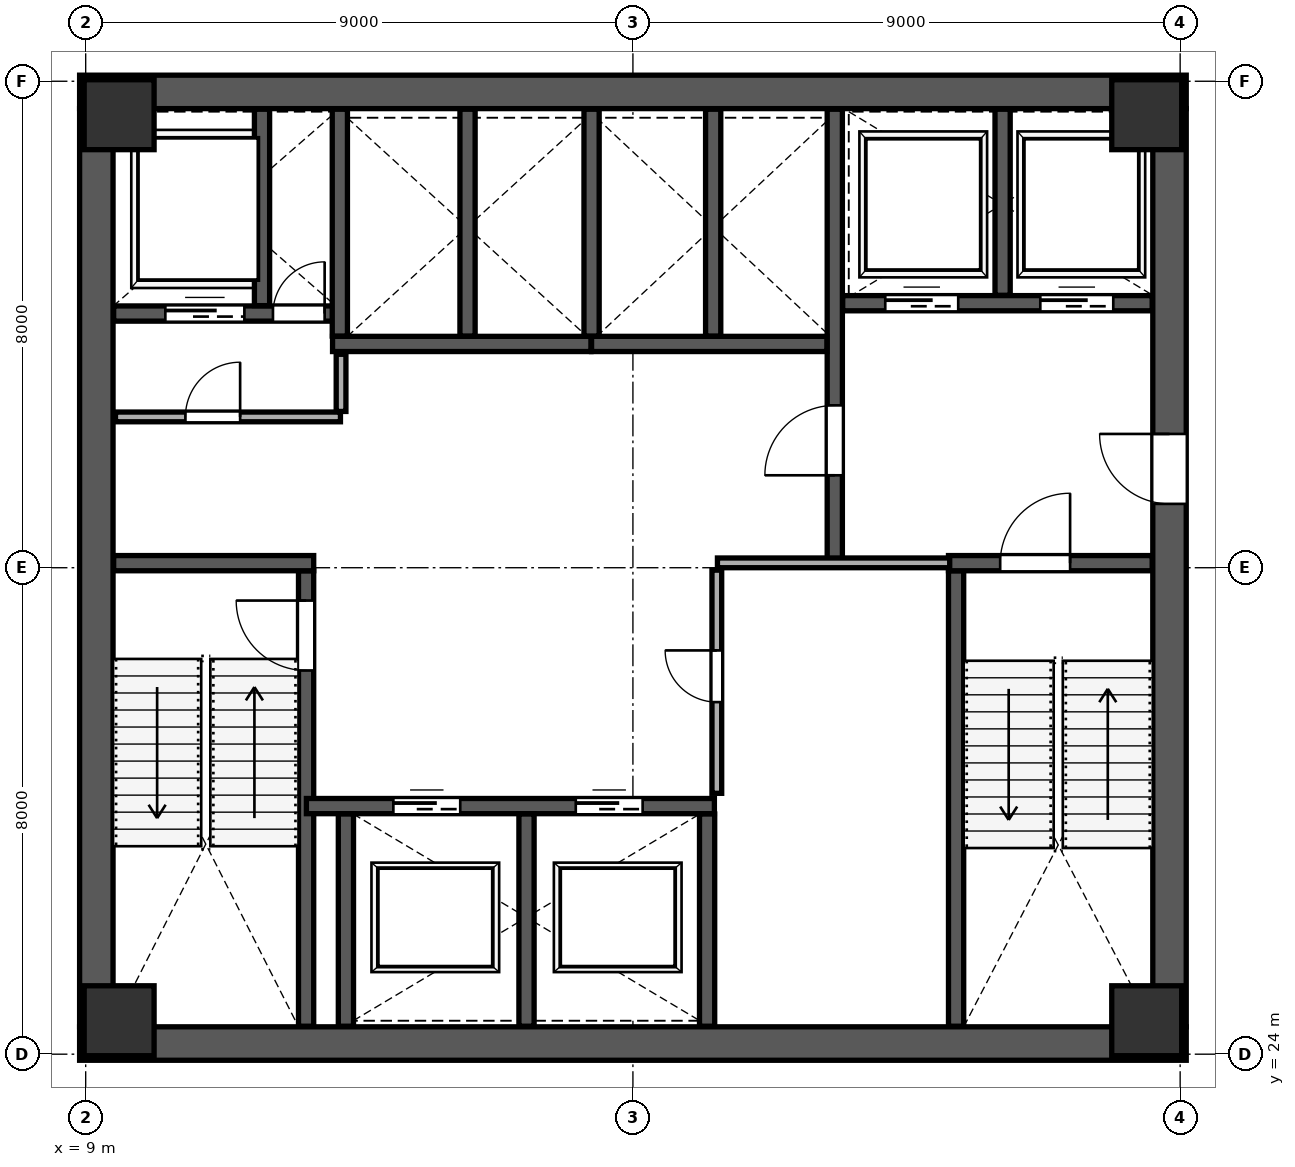
"""IFC4 building model, lengths in metres.
Left out: names, types, materials, properties, quantities, classifications, styles, units other than length and angle.
Written with IfcOpenShell. Run it as: python <this file> out.ifc"""

import sys

from ifc_helpers import new_model, si_unit, direction, frame, frame_2d, origin, origin_2d, place, context, subcontext, project, spatial, rectangle, extrude, source, transform, mapped, element, fill, save


model = new_model("IFC4")
c1 = context("Model", 3, precision=1e-05, world=origin(), true_north=direction((0.0, 1.0)))
c2 = subcontext(c1, "Body", "Model", "MODEL_VIEW")
j1 = project(units=[si_unit("LENGTHUNIT", "METRE"), si_unit("PLANEANGLEUNIT", "RADIAN")], contexts=[c1])
p1 = place(None, origin())
s1 = spatial("IfcSite", under=j1, at=p1, CompositionType="ELEMENT")
p2 = place(p1, origin())
s2 = spatial("IfcBuilding", under=s1, at=p2, CompositionType="ELEMENT")
p3 = place(p2, frame((0.0, 0.0, 66.4)))
s3 = spatial("IfcBuildingStorey", under=s2, at=p3, CompositionType="ELEMENT", Elevation=66.4)
m1 = source(origin(), c2, "Body", "SweptSolid", [
    extrude(rectangle(XDim=1.15, YDim=1.15, at=origin_2d()), origin(), (0.0, 0.0, 1.0), 4.199),
])
for number, where, z_axis, x_axis in (
    (1, (9.55, 24.55, 0.001), (0.0, 0.0, 1.0), (1.0, 0.0, 0.0)),
    (2, (26.45, 24.55, 0.001), (0.0, 0.0, 1.0), (1.0, 0.0, 0.0)),
    (3, (9.55, 39.45, 0.001), (0.0, 0.0, 1.0), (1.0, 0.0, 0.0)),
    (4, (26.45, 39.45, 0.001), (0.0, 0.0, 1.0), (1.0, 0.0, 0.0)),
):
    element("IfcColumn", number, at=place(p3, frame(where, z_axis=z_axis, x_axis=x_axis)), inside=s3, PredefinedType="COLUMN", context=c2, shape_type="MappedRepresentation", body=[
        mapped(m1, transform((0.0, 0.0, 0.0), scale=1.0)),
    ])
p4 = place(p3, frame((9.175, 24.45, 0.0), z_axis=(0.0, 0.0, 1.0), x_axis=(0.0, 1.0, 0.0)))
e5 = element("IfcWall", 5, at=p4, inside=s3, PredefinedType="SHEAR", context=c2, shape_type="SweptSolid", body=[
    extrude(rectangle(XDim=15.1, YDim=0.55, at=frame_2d((7.55, 0.0))), origin(), (0.0, 0.0, 1.0), 3.96),
])
p5 = place(p3, frame((26.825, 24.45, 0.0), z_axis=(0.0, 0.0, 1.0), x_axis=(0.0, 1.0, 0.0)))
e6 = element("IfcWall", 6, at=p5, inside=s3, PredefinedType="SHEAR", context=c2, shape_type="SweptSolid", body=[
    extrude(rectangle(XDim=15.1, YDim=0.55, at=frame_2d((7.55, 0.0))), origin(), (0.0, 0.0, 1.0), 3.96),
])
p6 = place(p5, frame((8.6, 0.0, 0.0)))
e7 = element("IfcOpeningElement", 7, at=p6, cuts=e6, PredefinedType="OPENING", context=c2, shape_type="SweptSolid", body=[
    extrude(rectangle(XDim=1.15, YDim=2.2, at=frame_2d((0.575, 1.1))), frame((0.0, 0.285, 0.0), z_axis=(0.0, -1.0, 0.0), x_axis=(1.0, 0.0, 0.0)), (0.0, 0.0, 1.0), 0.57),
])
for number, where, z_axis, x_axis in (
    (8, (8.9, 24.175, 0.0), (0.0, 0.0, 1.0), (1.0, 0.0, 0.0)),
    (9, (8.9, 39.825, 0.0), (0.0, 0.0, 1.0), (1.0, 0.0, 0.0)),
):
    element("IfcWall", number, at=place(p3, frame(where, z_axis=z_axis, x_axis=x_axis)), inside=s3, PredefinedType="SHEAR", context=c2, shape_type="SweptSolid", body=[
        extrude(rectangle(XDim=18.2, YDim=0.55, at=frame_2d((9.1, 0.0))), origin(), (0.0, 0.0, 1.0), 3.96),
    ])
p7 = place(p3, frame((12.625, 24.46, 0.0), z_axis=(0.0, 0.0, 1.0), x_axis=(0.0, 1.0, 0.0)))
e10 = element("IfcWall", 10, at=p7, inside=s3, PredefinedType="SHEAR", context=c2, shape_type="SweptSolid", body=[
    extrude(rectangle(XDim=7.49, YDim=0.25, at=frame_2d((3.745, 0.0))), origin(), (0.0, 0.0, 1.0), 3.96),
])
p8 = place(p7, frame((5.85, 0.0, 0.0)))
e11 = element("IfcOpeningElement", 11, at=p8, cuts=e10, PredefinedType="OPENING", context=c2, shape_type="SweptSolid", body=[
    extrude(rectangle(XDim=1.15, YDim=2.2, at=frame_2d((0.575, 1.1))), frame((0.0, 0.135, 0.0), z_axis=(0.0, -1.0, 0.0), x_axis=(1.0, 0.0, 0.0)), (0.0, 0.0, 1.0), 0.27),
])
p9 = place(p3, frame((9.46, 32.075, 0.0), z_axis=(0.0, 0.0, 1.0), x_axis=(1.0, 0.0, 0.0)))
e12 = element("IfcWall", 12, at=p9, inside=s3, PredefinedType="SHEAR", context=c2, shape_type="SweptSolid", body=[
    extrude(rectangle(XDim=3.29, YDim=0.25, at=frame_2d((1.645, 0.0))), origin(), (0.0, 0.0, 1.0), 3.96),
])
p10 = place(p3, frame((23.315, 24.46, 0.0), z_axis=(0.0, 0.0, 1.0), x_axis=(0.0, 1.0, 0.0)))
e13 = element("IfcWall", 13, at=p10, inside=s3, PredefinedType="SHEAR", context=c2, shape_type="SweptSolid", body=[
    extrude(rectangle(XDim=7.49, YDim=0.25, at=frame_2d((3.745, 0.0))), origin(), (0.0, 0.0, 1.0), 3.96),
])
p11 = place(p3, frame((23.19, 32.075, 0.0), z_axis=(0.0, 0.0, 1.0), x_axis=(1.0, 0.0, 0.0)))
e14 = element("IfcWall", 14, at=p11, inside=s3, PredefinedType="SHEAR", context=c2, shape_type="SweptSolid", body=[
    extrude(rectangle(XDim=3.35, YDim=0.25, at=frame_2d((1.675, 0.0))), origin(), (0.0, 0.0, 1.0), 3.96),
])
p12 = place(p11, frame((0.85, 0.0, 0.0)))
e15 = element("IfcOpeningElement", 15, at=p12, cuts=e14, PredefinedType="OPENING", context=c2, shape_type="SweptSolid", body=[
    extrude(rectangle(XDim=1.15, YDim=2.2, at=frame_2d((0.575, 1.1))), frame((0.0, 0.135, 0.0), z_axis=(0.0, -1.0, 0.0), x_axis=(1.0, 0.0, 0.0)), (0.0, 0.0, 1.0), 0.27),
])
p13 = place(p3, frame((21.32, 32.12, 0.0), z_axis=(0.0, 0.0, 1.0), x_axis=(0.0, 1.0, 0.0)))
e16 = element("IfcWall", 16, at=p13, inside=s3, PredefinedType="SHEAR", context=c2, shape_type="SweptSolid", body=[
    extrude(rectangle(XDim=7.42, YDim=0.25, at=frame_2d((3.71, 0.0))), origin(), (0.0, 0.0, 1.0), 3.96),
])
p14 = place(p13, frame((1.4, 0.0, 0.0)))
e17 = element("IfcOpeningElement", 17, at=p14, cuts=e16, PredefinedType="OPENING", context=c2, shape_type="SweptSolid", body=[
    extrude(rectangle(XDim=1.15, YDim=2.2, at=frame_2d((0.575, 1.1))), frame((0.0, 0.135, 0.0), z_axis=(0.0, -1.0, 0.0), x_axis=(1.0, 0.0, 0.0)), (0.0, 0.0, 1.0), 0.27),
])
p15 = place(p3, frame((9.46, 36.18, 0.0), z_axis=(0.0, 0.0, 1.0), x_axis=(1.0, 0.0, 0.0)))
e18 = element("IfcWall", 18, at=p15, inside=s3, PredefinedType="SHEAR", context=c2, shape_type="SweptSolid", body=[
    extrude(rectangle(XDim=3.79, YDim=0.25, at=frame_2d((1.895, 0.0))), origin(), (0.0, 0.0, 1.0), 3.96),
])
p16 = place(p15, frame((2.62, 0.0, 0.0)))
e19 = element("IfcOpeningElement", 19, at=p16, cuts=e18, PredefinedType="OPENING", context=c2, shape_type="SweptSolid", body=[
    extrude(rectangle(XDim=0.85, YDim=2.1, at=frame_2d((0.425, 1.05))), frame((0.0, 0.135, 0.0), z_axis=(0.0, -1.0, 0.0), x_axis=(1.0, 0.0, 0.0)), (0.0, 0.0, 1.0), 0.27),
])
p17 = place(p15, frame((0.85, 0.0, 0.0)))
e20 = element("IfcOpeningElement", 20, at=p17, cuts=e18, PredefinedType="OPENING", context=c2, shape_type="SweptSolid", body=[
    extrude(rectangle(XDim=1.3, YDim=2.25, at=frame_2d((0.65, 1.125))), frame((0.0, 0.135, 0.0), z_axis=(0.0, -1.0, 0.0), x_axis=(1.0, 0.0, 0.0)), (0.0, 0.0, 1.0), 0.27),
])
p18 = place(p3, frame((11.9, 36.31, 0.0), z_axis=(0.0, 0.0, 1.0), x_axis=(0.0, 1.0, 0.0)))
e21 = element("IfcWall", 21, at=p18, inside=s3, PredefinedType="SHEAR", context=c2, shape_type="SweptSolid", body=[
    extrude(rectangle(XDim=3.23, YDim=0.25, at=frame_2d((1.615, 0.0))), origin(), (0.0, 0.0, 1.0), 3.96),
])
p19 = place(p3, frame((21.45, 36.35, 0.0), z_axis=(0.0, 0.0, 1.0), x_axis=(1.0, 0.0, 0.0)))
e22 = element("IfcWall", 22, at=p19, inside=s3, PredefinedType="SHEAR", context=c2, shape_type="SweptSolid", body=[
    extrude(rectangle(XDim=5.09, YDim=0.25, at=frame_2d((2.545, 0.0))), origin(), (0.0, 0.0, 1.0), 3.96),
])
p20 = place(p19, frame((0.7, 0.0, 0.0)))
e23 = element("IfcOpeningElement", 23, at=p20, cuts=e22, PredefinedType="OPENING", context=c2, shape_type="SweptSolid", body=[
    extrude(rectangle(XDim=1.2, YDim=2.2, at=frame_2d((0.6, 1.1))), frame((0.0, 0.135, 0.0), z_axis=(0.0, -1.0, 0.0), x_axis=(1.0, 0.0, 0.0)), (0.0, 0.0, 1.0), 0.27),
])
p21 = place(p19, frame((3.25, 0.0, 0.0)))
e24 = element("IfcOpeningElement", 24, at=p21, cuts=e22, PredefinedType="OPENING", context=c2, shape_type="SweptSolid", body=[
    extrude(rectangle(XDim=1.2, YDim=2.2, at=frame_2d((0.6, 1.1))), frame((0.0, 0.135, 0.0), z_axis=(0.0, -1.0, 0.0), x_axis=(1.0, 0.0, 0.0)), (0.0, 0.0, 1.0), 0.27),
])
p22 = place(p3, frame((24.08, 36.48, 0.0), z_axis=(0.0, 0.0, 1.0), x_axis=(0.0, 1.0, 0.0)))
e25 = element("IfcWall", 25, at=p22, inside=s3, PredefinedType="SHEAR", context=c2, shape_type="SweptSolid", body=[
    extrude(rectangle(XDim=3.06, YDim=0.25, at=frame_2d((1.53, 0.0))), origin(), (0.0, 0.0, 1.0), 3.96),
])
p23 = place(p3, frame((12.63, 28.08, 0.0), z_axis=(0.0, 0.0, 1.0), x_axis=(1.0, 0.0, 0.0)))
e26 = element("IfcWall", 26, at=p23, inside=s3, PredefinedType="SHEAR", context=c2, shape_type="SweptSolid", body=[
    extrude(rectangle(XDim=6.71, YDim=0.25, at=frame_2d((3.355, 0.0))), origin(), (0.0, 0.0, 1.0), 3.96),
])
p24 = place(p23, frame((1.43, 0.0, 0.0)))
e27 = element("IfcOpeningElement", 27, at=p24, cuts=e26, PredefinedType="OPENING", context=c2, shape_type="SweptSolid", body=[
    extrude(rectangle(XDim=1.1, YDim=2.2, at=frame_2d((0.55, 1.1))), frame((0.0, 0.135, 0.0), z_axis=(0.0, -1.0, 0.0), x_axis=(1.0, 0.0, 0.0)), (0.0, 0.0, 1.0), 0.27),
])
p25 = place(p23, frame((4.43, 0.0, 0.0)))
e28 = element("IfcOpeningElement", 28, at=p25, cuts=e26, PredefinedType="OPENING", context=c2, shape_type="SweptSolid", body=[
    extrude(rectangle(XDim=1.1, YDim=2.2, at=frame_2d((0.55, 1.1))), frame((0.0, 0.135, 0.0), z_axis=(0.0, -1.0, 0.0), x_axis=(1.0, 0.0, 0.0)), (0.0, 0.0, 1.0), 0.27),
])
for number, where, z_axis, x_axis in (
    (29, (13.28, 24.46, 0.0), (0.0, 0.0, 1.0), (0.0, 1.0, 0.0)),
    (30, (16.25, 24.46, 0.0), (0.0, 0.0, 1.0), (0.0, 1.0, 0.0)),
    (31, (19.22, 24.46, 0.0), (0.0, 0.0, 1.0), (0.0, 1.0, 0.0)),
):
    element("IfcWall", number, at=place(p3, frame(where, z_axis=z_axis, x_axis=x_axis)), inside=s3, PredefinedType="SHEAR", context=c2, shape_type="SweptSolid", body=[
        extrude(rectangle(XDim=3.49, YDim=0.25, at=frame_2d((1.745, 0.0))), origin(), (0.0, 0.0, 1.0), 3.96),
    ])
p26 = place(p3, frame((13.06, 35.68, 0.0), z_axis=(0.0, 0.0, 1.0), x_axis=(1.0, 0.0, 0.0)))
e32 = element("IfcWall", 32, at=p26, inside=s3, PredefinedType="SHEAR", context=c2, shape_type="SweptSolid", body=[
    extrude(rectangle(XDim=4.25, YDim=0.25, at=frame_2d((2.125, 0.0))), origin(), (0.0, 0.0, 1.0), 3.96),
])
for number, where, z_axis, x_axis in (
    (33, (13.18, 35.81, 0.0), (0.0, 0.0, 1.0), (0.0, 1.0, 0.0)),
    (34, (15.28, 35.81, 0.0), (0.0, 0.0, 1.0), (0.0, 1.0, 0.0)),
):
    element("IfcWall", number, at=place(p3, frame(where, z_axis=z_axis, x_axis=x_axis)), inside=s3, PredefinedType="SHEAR", context=c2, shape_type="SweptSolid", body=[
        extrude(rectangle(XDim=3.73, YDim=0.25, at=frame_2d((1.865, 0.0))), origin(), (0.0, 0.0, 1.0), 3.96),
    ])
p27 = place(p3, frame((17.32, 35.68, 0.0), z_axis=(0.0, 0.0, 1.0), x_axis=(1.0, 0.0, 0.0)))
e35 = element("IfcWall", 35, at=p27, inside=s3, PredefinedType="SHEAR", context=c2, shape_type="SweptSolid", body=[
    extrude(rectangle(XDim=3.87, YDim=0.25, at=frame_2d((1.935, 0.0))), origin(), (0.0, 0.0, 1.0), 3.96),
])
for number, where, z_axis, x_axis in (
    (36, (17.32, 35.81, 0.0), (0.0, 0.0, 1.0), (0.0, 1.0, 0.0)),
    (37, (19.32, 35.81, 0.0), (0.0, 0.0, 1.0), (0.0, 1.0, 0.0)),
):
    element("IfcWall", number, at=place(p3, frame(where, z_axis=z_axis, x_axis=x_axis)), inside=s3, PredefinedType="SHEAR", context=c2, shape_type="SweptSolid", body=[
        extrude(rectangle(XDim=3.73, YDim=0.25, at=frame_2d((1.865, 0.0))), origin(), (0.0, 0.0, 1.0), 3.96),
    ])
p28 = place(p3, frame((9.49, 34.48, 0.0), z_axis=(0.0, 0.0, 1.0), x_axis=(1.0, 0.0, 0.0)))
e38 = element("IfcWall", 38, at=p28, inside=s3, PredefinedType="PARTITIONING", context=c2, shape_type="SweptSolid", body=[
    extrude(rectangle(XDim=3.7, YDim=0.16, at=frame_2d((1.85, 0.0))), origin(), (0.0, 0.0, 1.0), 3.96),
])
p29 = place(p28, frame((1.15, 0.0, 0.0)))
e39 = element("IfcOpeningElement", 39, at=p29, cuts=e38, PredefinedType="OPENING", context=c2, shape_type="SweptSolid", body=[
    extrude(rectangle(XDim=0.9, YDim=2.15, at=frame_2d((0.45, 1.075))), frame((0.0, 0.09, 0.0), z_axis=(0.0, -1.0, 0.0), x_axis=(1.0, 0.0, 0.0)), (0.0, 0.0, 1.0), 0.18),
])
p30 = place(p3, frame((13.2, 34.57, 0.0), z_axis=(0.0, 0.0, 1.0), x_axis=(0.0, 1.0, 0.0)))
e40 = element("IfcWall", 40, at=p30, inside=s3, PredefinedType="PARTITIONING", context=c2, shape_type="SweptSolid", body=[
    extrude(rectangle(XDim=0.94, YDim=0.16, at=frame_2d((0.47, 0.0))), origin(), (0.0, 0.0, 1.0), 3.96),
])
p31 = place(p3, frame((19.39, 32.08, 0.0), z_axis=(0.0, 0.0, 1.0), x_axis=(1.0, 0.0, 0.0)))
e41 = element("IfcWall", 41, at=p31, inside=s3, PredefinedType="PARTITIONING", context=c2, shape_type="SweptSolid", body=[
    extrude(rectangle(XDim=3.82, YDim=0.16, at=frame_2d((1.91, 0.0))), origin(), (0.0, 0.0, 1.0), 3.96),
])
p32 = place(p3, frame((19.38, 28.29, 0.0), z_axis=(0.0, 0.0, 1.0), x_axis=(0.0, 1.0, 0.0)))
e42 = element("IfcWall", 42, at=p32, inside=s3, PredefinedType="PARTITIONING", context=c2, shape_type="SweptSolid", body=[
    extrude(rectangle(XDim=3.67, YDim=0.16, at=frame_2d((1.835, 0.0))), origin(), (0.0, 0.0, 1.0), 3.96),
])
p33 = place(p32, frame((1.5, 0.0, 0.0)))
e43 = element("IfcOpeningElement", 43, at=p33, cuts=e42, PredefinedType="OPENING", context=c2, shape_type="SweptSolid", body=[
    extrude(rectangle(XDim=0.85, YDim=2.1, at=frame_2d((0.425, 1.05))), frame((0.0, 0.09, 0.0), z_axis=(0.0, -1.0, 0.0), x_axis=(1.0, 0.0, 0.0)), (0.0, 0.0, 1.0), 0.18),
])
p34 = place(p3, frame((27.595, 13.022, 0.0), z_axis=(0.0, 0.0, 1.0), x_axis=(0.130532558102, 0.991444023269, 0.0)))
e44 = element("IfcWall", 44, at=p34, inside=s3, PredefinedType="PARTITIONING", context=c2, shape_type="SweptSolid", body=[
    extrude(rectangle(XDim=14.08, YDim=0.16, at=frame_2d((7.04, 0.0))), origin(), (0.0, 0.0, 1.0), 3.96),
])
m2 = source(origin(), c2, "Body", "SweptSolid", [
    extrude(rectangle(XDim=1.15, YDim=2.2, at=frame_2d((0.575, 1.1))), frame((0.0, 0.025, 0.0), z_axis=(0.0, -1.0, 0.0), x_axis=(1.0, 0.0, 0.0)), (0.0, 0.0, 1.0), 0.05),
])
p35 = place(p8, origin())
e45 = element("IfcDoor", 45, at=p35, inside=s3, OperationType="SINGLE_SWING_RIGHT", PredefinedType="DOOR", context=c2, shape_type="MappedRepresentation", body=[
    mapped(m2, transform((0.0, 0.0, 0.0), scale=1.0)),
])
fill(e11, e45)
m3 = source(origin(), c2, "Body", "SweptSolid", [
    extrude(rectangle(XDim=1.15, YDim=2.2, at=frame_2d((0.575, 1.1))), frame((0.0, 0.025, 0.0), z_axis=(0.0, -1.0, 0.0), x_axis=(1.0, 0.0, 0.0)), (0.0, 0.0, 1.0), 0.05),
])
p36 = place(p14, origin())
e46 = element("IfcDoor", 46, at=p36, inside=s3, OperationType="SINGLE_SWING_LEFT", PredefinedType="DOOR", context=c2, shape_type="MappedRepresentation", body=[
    mapped(m3, transform((0.0, 0.0, 0.0), scale=1.0)),
])
fill(e17, e46)
p37 = place(p12, origin())
e47 = element("IfcDoor", 47, at=p37, inside=s3, OperationType="SINGLE_SWING_RIGHT", PredefinedType="DOOR", context=c2, shape_type="MappedRepresentation", body=[
    mapped(m2, transform((0.0, 0.0, 0.0), scale=1.0)),
])
fill(e15, e47)
p38 = place(p6, origin())
e48 = element("IfcDoor", 48, at=p38, inside=s3, OperationType="SINGLE_SWING_RIGHT", PredefinedType="DOOR", context=c2, shape_type="MappedRepresentation", body=[
    mapped(m3, transform((0.0, 0.0, 0.0), scale=1.0)),
])
fill(e7, e48)
m4 = source(origin(), c2, "Body", "SweptSolid", [
    extrude(rectangle(XDim=0.85, YDim=2.1, at=frame_2d((0.425, 1.05))), frame((0.0, 0.025, 0.0), z_axis=(0.0, -1.0, 0.0), x_axis=(1.0, 0.0, 0.0)), (0.0, 0.0, 1.0), 0.05),
])
p39 = place(p16, origin())
e49 = element("IfcDoor", 49, at=p39, inside=s3, OperationType="SINGLE_SWING_RIGHT", PredefinedType="DOOR", context=c2, shape_type="MappedRepresentation", body=[
    mapped(m4, transform((0.0, 0.0, 0.0), scale=1.0)),
])
fill(e19, e49)
m5 = source(origin(), c2, "Body", "SweptSolid", [
    extrude(rectangle(XDim=1.1, YDim=2.2, at=frame_2d((0.55, 1.1))), frame((0.0, 0.025, 0.0), z_axis=(0.0, -1.0, 0.0), x_axis=(1.0, 0.0, 0.0)), (0.0, 0.0, 1.0), 0.05),
])
p40 = place(p24, origin())
e50 = element("IfcDoor", 50, at=p40, inside=s3, OperationType="SLIDING_TO_LEFT", PredefinedType="DOOR", context=c2, shape_type="MappedRepresentation", body=[
    mapped(m5, transform((0.0, 0.0, 0.0), scale=1.0)),
])
fill(e27, e50)
p41 = place(p25, origin())
e51 = element("IfcDoor", 51, at=p41, inside=s3, OperationType="SLIDING_TO_RIGHT", PredefinedType="DOOR", context=c2, shape_type="MappedRepresentation", body=[
    mapped(m5, transform((0.0, 0.0, 0.0), scale=1.0)),
])
fill(e28, e51)
m6 = source(origin(), c2, "Body", "SweptSolid", [
    extrude(rectangle(XDim=1.2, YDim=2.2, at=frame_2d((0.6, 1.1))), frame((0.0, 0.025, 0.0), z_axis=(0.0, -1.0, 0.0), x_axis=(1.0, 0.0, 0.0)), (0.0, 0.0, 1.0), 0.05),
])
p42 = place(p20, origin())
e52 = element("IfcDoor", 52, at=p42, inside=s3, OperationType="SLIDING_TO_LEFT", PredefinedType="DOOR", context=c2, shape_type="MappedRepresentation", body=[
    mapped(m6, transform((0.0, 0.0, 0.0), scale=1.0)),
])
fill(e23, e52)
p43 = place(p21, origin())
e53 = element("IfcDoor", 53, at=p43, inside=s3, OperationType="SLIDING_TO_RIGHT", PredefinedType="DOOR", context=c2, shape_type="MappedRepresentation", body=[
    mapped(m6, transform((0.0, 0.0, 0.0), scale=1.0)),
])
fill(e24, e53)
m7 = source(origin(), c2, "Body", "SweptSolid", [
    extrude(rectangle(XDim=1.3, YDim=2.25, at=frame_2d((0.65, 1.125))), frame((0.0, 0.025, 0.0), z_axis=(0.0, -1.0, 0.0), x_axis=(1.0, 0.0, 0.0)), (0.0, 0.0, 1.0), 0.05),
])
p44 = place(p17, origin())
e54 = element("IfcDoor", 54, at=p44, inside=s3, OperationType="SLIDING_TO_LEFT", PredefinedType="DOOR", context=c2, shape_type="MappedRepresentation", body=[
    mapped(m7, transform((0.0, 0.0, 0.0), scale=1.0)),
])
fill(e20, e54)
m8 = source(origin(), c2, "Body", "SweptSolid", [
    extrude(rectangle(XDim=0.9, YDim=2.15, at=frame_2d((0.45, 1.075))), frame((0.0, 0.025, 0.0), z_axis=(0.0, -1.0, 0.0), x_axis=(1.0, 0.0, 0.0)), (0.0, 0.0, 1.0), 0.05),
])
p45 = place(p29, origin())
e55 = element("IfcDoor", 55, at=p45, inside=s3, OperationType="SINGLE_SWING_RIGHT", PredefinedType="DOOR", context=c2, shape_type="MappedRepresentation", body=[
    mapped(m8, transform((0.0, 0.0, 0.0), scale=1.0)),
])
fill(e39, e55)
p46 = place(p33, origin())
e56 = element("IfcDoor", 56, at=p46, inside=s3, OperationType="SINGLE_SWING_RIGHT", PredefinedType="DOOR", context=c2, shape_type="MappedRepresentation", body=[
    mapped(m4, transform((0.0, 0.0, 0.0), scale=1.0)),
])
fill(e43, e56)
save(model, sys.argv[1])
